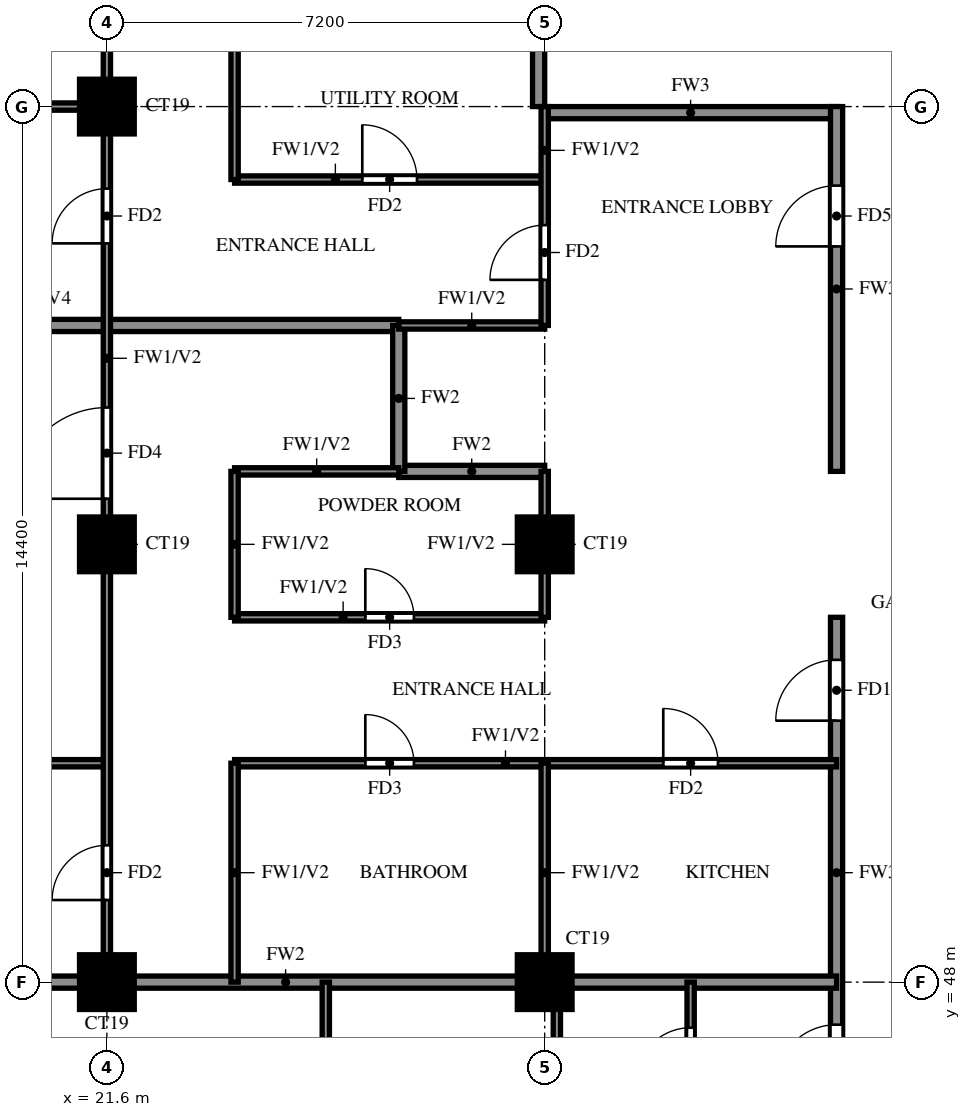
"""IFC4 building model, lengths in metres.
Left out: names, types, materials, properties, quantities, classifications, styles, units other than length and angle.
Written with IfcOpenShell. Run it as: python <this file> out.ifc"""

import sys

from ifc_helpers import new_model, si_unit, direction, frame, frame_2d, origin, origin_2d, place, context, subcontext, project, spatial, rectangle, extrude, source, transform, mapped, element, fill, save


model = new_model("IFC4")
c1 = context("Model", 3, precision=1e-05, world=origin(), true_north=direction((0.0, 1.0)))
c2 = subcontext(c1, "Body", "Model", "MODEL_VIEW")
j1 = project(units=[si_unit("LENGTHUNIT", "METRE"), si_unit("PLANEANGLEUNIT", "RADIAN")], contexts=[c1])
p1 = place(None, origin())
s1 = spatial("IfcSite", under=j1, at=p1, CompositionType="ELEMENT")
p2 = place(p1, origin())
s2 = spatial("IfcBuilding", under=s1, at=p2, CompositionType="ELEMENT")
p3 = place(p2, frame((0.0, 0.0, 181.5)))
s3 = spatial("IfcBuildingStorey", under=s2, at=p3, CompositionType="ELEMENT", Elevation=181.5)
m1 = source(origin(), c2, "Body", "SweptSolid", [
    extrude(rectangle(XDim=0.9, YDim=0.9, at=origin_2d()), origin(), (0.0, 0.0, 1.0), 3.2),
])
for number, where, z_axis, x_axis in (
    (1, (21.6, 48.0, 0.0), (0.0, 0.0, 1.0), (1.0, 0.0, 0.0)),
    (2, (28.8, 48.0, 0.0), (0.0, 0.0, 1.0), (1.0, 0.0, 0.0)),
    (3, (21.6, 55.2, 0.0), (0.0, 0.0, 1.0), (1.0, 0.0, 0.0)),
    (4, (28.8, 55.2, 0.0), (0.0, 0.0, 1.0), (1.0, 0.0, 0.0)),
    (5, (21.6, 62.4, 0.0), (0.0, 0.0, 1.0), (1.0, 0.0, 0.0)),
):
    element("IfcColumn", number, at=place(p3, frame(where, z_axis=z_axis, x_axis=x_axis)), inside=s3, PredefinedType="COLUMN", context=c2, shape_type="MappedRepresentation", body=[
        mapped(m1, transform((0.0, 0.0, 0.0))),
    ])
p4 = place(p3, frame((28.8, 62.3, 0.0), z_axis=(0.0, 0.0, 1.0), x_axis=(1.0, 0.0, 0.0)))
e6 = element("IfcWall", 6, at=p4, inside=s3, PredefinedType="SOLIDWALL", context=c2, shape_type="SweptSolid", body=[
    extrude(rectangle(XDim=4.8, YDim=0.2, at=frame_2d((2.4, 0.0))), origin(), (0.0, 0.0, 1.0), 3.2),
])
p5 = place(p3, frame((28.7, 62.4, 0.0), z_axis=(0.0, 0.0, 1.0), x_axis=(0.0, 1.0, 0.0)))
e7 = element("IfcWall", 7, at=p5, inside=s3, PredefinedType="SOLIDWALL", context=c2, shape_type="SweptSolid", body=[
    extrude(rectangle(XDim=15.6, YDim=0.2, at=frame_2d((7.8, 0.0))), origin(), (0.0, 0.0, 1.0), 3.2),
])
p6 = place(p3, frame((33.6, 45.6, 0.0), z_axis=(0.0, 0.0, 1.0), x_axis=(0.0, 1.0, 0.0)))
e8 = element("IfcWall", 8, at=p6, inside=s3, PredefinedType="SOLIDWALL", context=c2, shape_type="SweptSolid", body=[
    extrude(rectangle(XDim=8.4, YDim=0.2, at=frame_2d((4.2, 0.0))), origin(), (0.0, 0.0, 1.0), 3.2),
])
p7 = place(p6, frame((0.7, 0.0, 0.0)))
e9 = element("IfcOpeningElement", 9, at=p7, cuts=e8, PredefinedType="OPENING", context=c2, shape_type="SweptSolid", body=[
    extrude(rectangle(XDim=1.0, YDim=2.1, at=frame_2d((0.5, 1.05))), frame((0.0, 0.11, 0.0), z_axis=(0.0, -1.0, 0.0), x_axis=(1.0, 0.0, 0.0)), (0.0, 0.0, 1.0), 0.22),
])
p8 = place(p6, frame((6.7, 0.0, 0.0)))
e10 = element("IfcOpeningElement", 10, at=p8, cuts=e8, PredefinedType="OPENING", context=c2, shape_type="SweptSolid", body=[
    extrude(rectangle(XDim=1.0, YDim=2.1, at=frame_2d((0.5, 1.05))), frame((0.0, 0.11, 0.0), z_axis=(0.0, -1.0, 0.0), x_axis=(1.0, 0.0, 0.0)), (0.0, 0.0, 1.0), 0.22),
])
p9 = place(p3, frame((33.6, 56.4, 0.0), z_axis=(0.0, 0.0, 1.0), x_axis=(0.0, 1.0, 0.0)))
e11 = element("IfcWall", 11, at=p9, inside=s3, PredefinedType="SOLIDWALL", context=c2, shape_type="SweptSolid", body=[
    extrude(rectangle(XDim=6.0, YDim=0.2, at=frame_2d((3.0, 0.0))), origin(), (0.0, 0.0, 1.0), 3.2),
])
p10 = place(p9, frame((3.7, 0.0, 0.0)))
e12 = element("IfcOpeningElement", 12, at=p10, cuts=e11, PredefinedType="OPENING", context=c2, shape_type="SweptSolid", body=[
    extrude(rectangle(XDim=1.0, YDim=2.1, at=frame_2d((0.5, 1.05))), frame((0.0, 0.11, 0.0), z_axis=(0.0, -1.0, 0.0), x_axis=(1.0, 0.0, 0.0)), (0.0, 0.0, 1.0), 0.22),
])
p11 = place(p3, frame((14.525, 48.0, 0.0), z_axis=(0.0, 0.0, 1.0), x_axis=(1.0, 0.0, 0.0)))
e13 = element("IfcWall", 13, at=p11, inside=s3, PredefinedType="SOLIDWALL", context=c2, shape_type="SweptSolid", body=[
    extrude(rectangle(XDim=19.075, YDim=0.2, at=frame_2d((9.538, 0.0))), origin(), (0.0, 0.0, 1.0), 3.2),
])
p12 = place(p3, frame((26.4, 56.4, 0.0), z_axis=(0.0, 0.0, 1.0), x_axis=(1.0, 0.0, 0.0)))
e14 = element("IfcWall", 14, at=p12, inside=s3, PredefinedType="SOLIDWALL", context=c2, shape_type="SweptSolid", body=[
    extrude(rectangle(XDim=2.4, YDim=0.2, at=frame_2d((1.2, 0.0))), origin(), (0.0, 0.0, 1.0), 3.2),
])
p13 = place(p3, frame((14.525, 58.8, 0.0), z_axis=(0.0, 0.0, 1.0), x_axis=(1.0, 0.0, 0.0)))
e15 = element("IfcWall", 15, at=p13, inside=s3, PredefinedType="SOLIDWALL", context=c2, shape_type="SweptSolid", body=[
    extrude(rectangle(XDim=11.875, YDim=0.2, at=frame_2d((5.938, 0.0))), origin(), (0.0, 0.0, 1.0), 2.3),
])
p14 = place(p3, frame((26.4, 56.4, 0.0), z_axis=(0.0, 0.0, 1.0), x_axis=(0.0, 1.0, 0.0)))
e16 = element("IfcWall", 16, at=p14, inside=s3, PredefinedType="SOLIDWALL", context=c2, shape_type="SweptSolid", body=[
    extrude(rectangle(XDim=2.4, YDim=0.2, at=frame_2d((1.2, 0.0))), origin(), (0.0, 0.0, 1.0), 3.2),
])
p15 = place(p3, frame((14.525, 51.6, 0.0), z_axis=(0.0, 0.0, 1.0), x_axis=(1.0, 0.0, 0.0)))
e17 = element("IfcWall", 17, at=p15, inside=s3, PredefinedType="PARTITIONING", context=c2, shape_type="SweptSolid", body=[
    extrude(rectangle(XDim=7.075, YDim=0.12, at=frame_2d((3.538, 0.0))), origin(), (0.0, 0.0, 1.0), 2.3),
])
p16 = place(p3, frame((23.7, 51.6, 0.0), z_axis=(0.0, 0.0, 1.0), x_axis=(1.0, 0.0, 0.0)))
e18 = element("IfcWall", 18, at=p16, inside=s3, PredefinedType="PARTITIONING", context=c2, shape_type="SweptSolid", body=[
    extrude(rectangle(XDim=9.9, YDim=0.12, at=frame_2d((4.95, 0.0))), origin(), (0.0, 0.0, 1.0), 3.2),
])
p17 = place(p16, frame((2.15, 0.0, 0.0)))
e19 = element("IfcOpeningElement", 19, at=p17, cuts=e18, PredefinedType="OPENING", context=c2, shape_type="SweptSolid", body=[
    extrude(rectangle(XDim=0.8, YDim=2.1, at=frame_2d((0.4, 1.05))), frame((0.0, 0.07, 0.0), z_axis=(0.0, -1.0, 0.0), x_axis=(1.0, 0.0, 0.0)), (0.0, 0.0, 1.0), 0.14),
])
p18 = place(p16, frame((7.05, 0.0, 0.0)))
e20 = element("IfcOpeningElement", 20, at=p18, cuts=e18, PredefinedType="OPENING", context=c2, shape_type="SweptSolid", body=[
    extrude(rectangle(XDim=0.9, YDim=2.1, at=frame_2d((0.45, 1.05))), frame((0.0, 0.07, 0.0), z_axis=(0.0, -1.0, 0.0), x_axis=(1.0, 0.0, 0.0)), (0.0, 0.0, 1.0), 0.14),
])
p19 = place(p3, frame((23.7, 54.0, 0.0), z_axis=(0.0, 0.0, 1.0), x_axis=(1.0, 0.0, 0.0)))
e21 = element("IfcWall", 21, at=p19, inside=s3, PredefinedType="PARTITIONING", context=c2, shape_type="SweptSolid", body=[
    extrude(rectangle(XDim=5.1, YDim=0.12, at=frame_2d((2.55, 0.0))), origin(), (0.0, 0.0, 1.0), 3.2),
])
p20 = place(p19, frame((2.15, 0.0, 0.0)))
e22 = element("IfcOpeningElement", 22, at=p20, cuts=e21, PredefinedType="OPENING", context=c2, shape_type="SweptSolid", body=[
    extrude(rectangle(XDim=0.8, YDim=2.1, at=frame_2d((0.4, 1.05))), frame((0.0, 0.07, 0.0), z_axis=(0.0, -1.0, 0.0), x_axis=(1.0, 0.0, 0.0)), (0.0, 0.0, 1.0), 0.14),
])
p21 = place(p3, frame((23.7, 56.4, 0.0), z_axis=(0.0, 0.0, 1.0), x_axis=(1.0, 0.0, 0.0)))
e23 = element("IfcWall", 23, at=p21, inside=s3, PredefinedType="PARTITIONING", context=c2, shape_type="SweptSolid", body=[
    extrude(rectangle(XDim=2.7, YDim=0.12, at=frame_2d((1.35, 0.0))), origin(), (0.0, 0.0, 1.0), 3.2),
])
p22 = place(p3, frame((26.4, 58.8, 0.0), z_axis=(0.0, 0.0, 1.0), x_axis=(1.0, 0.0, 0.0)))
e24 = element("IfcWall", 24, at=p22, inside=s3, PredefinedType="PARTITIONING", context=c2, shape_type="SweptSolid", body=[
    extrude(rectangle(XDim=2.4, YDim=0.12, at=frame_2d((1.2, 0.0))), origin(), (0.0, 0.0, 1.0), 3.2),
])
p23 = place(p3, frame((23.7, 61.2, 0.0), z_axis=(0.0, 0.0, 1.0), x_axis=(1.0, 0.0, 0.0)))
e25 = element("IfcWall", 25, at=p23, inside=s3, PredefinedType="PARTITIONING", context=c2, shape_type="SweptSolid", body=[
    extrude(rectangle(XDim=5.1, YDim=0.12, at=frame_2d((2.55, 0.0))), origin(), (0.0, 0.0, 1.0), 3.2),
])
p24 = place(p23, frame((2.1, 0.0, 0.0)))
e26 = element("IfcOpeningElement", 26, at=p24, cuts=e25, PredefinedType="OPENING", context=c2, shape_type="SweptSolid", body=[
    extrude(rectangle(XDim=0.9, YDim=2.1, at=frame_2d((0.45, 1.05))), frame((0.0, 0.07, 0.0), z_axis=(0.0, -1.0, 0.0), x_axis=(1.0, 0.0, 0.0)), (0.0, 0.0, 1.0), 0.14),
])
p25 = place(p3, frame((14.525, 62.4, 0.0), z_axis=(0.0, 0.0, 1.0), x_axis=(1.0, 0.0, 0.0)))
e27 = element("IfcWall", 27, at=p25, inside=s3, PredefinedType="PARTITIONING", context=c2, shape_type="SweptSolid", body=[
    extrude(rectangle(XDim=7.075, YDim=0.12, at=frame_2d((3.538, 0.0))), origin(), (0.0, 0.0, 1.0), 3.2),
])
p26 = place(p3, frame((21.6, 48.0, 0.0), z_axis=(0.0, 0.0, 1.0), x_axis=(0.0, 1.0, 0.0)))
e28 = element("IfcWall", 28, at=p26, inside=s3, PredefinedType="PARTITIONING", context=c2, shape_type="SweptSolid", body=[
    extrude(rectangle(XDim=21.6, YDim=0.12, at=frame_2d((10.8, 0.0))), origin(), (0.0, 0.0, 1.0), 3.2),
])
p27 = place(p26, frame((1.35, 0.0, 0.0)))
e29 = element("IfcOpeningElement", 29, at=p27, cuts=e28, PredefinedType="OPENING", context=c2, shape_type="SweptSolid", body=[
    extrude(rectangle(XDim=0.9, YDim=2.1, at=frame_2d((0.45, 1.05))), frame((0.0, 0.07, 0.0), z_axis=(0.0, -1.0, 0.0), x_axis=(1.0, 0.0, 0.0)), (0.0, 0.0, 1.0), 0.14),
])
p28 = place(p26, frame((7.95, 0.0, 0.0)))
e30 = element("IfcOpeningElement", 30, at=p28, cuts=e28, PredefinedType="OPENING", context=c2, shape_type="SweptSolid", body=[
    extrude(rectangle(XDim=1.5, YDim=2.1, at=frame_2d((0.75, 1.05))), frame((0.0, 0.07, 0.0), z_axis=(0.0, -1.0, 0.0), x_axis=(1.0, 0.0, 0.0)), (0.0, 0.0, 1.0), 0.14),
])
p29 = place(p26, frame((12.15, 0.0, 0.0)))
e31 = element("IfcOpeningElement", 31, at=p29, cuts=e28, PredefinedType="OPENING", context=c2, shape_type="SweptSolid", body=[
    extrude(rectangle(XDim=0.9, YDim=2.1, at=frame_2d((0.45, 1.05))), frame((0.0, 0.07, 0.0), z_axis=(0.0, -1.0, 0.0), x_axis=(1.0, 0.0, 0.0)), (0.0, 0.0, 1.0), 0.14),
])
p30 = place(p26, frame((17.55, 0.0, 0.0)))
e32 = element("IfcOpeningElement", 32, at=p30, cuts=e28, PredefinedType="OPENING", context=c2, shape_type="SweptSolid", body=[
    extrude(rectangle(XDim=0.9, YDim=2.1, at=frame_2d((0.45, 1.05))), frame((0.0, 0.07, 0.0), z_axis=(0.0, -1.0, 0.0), x_axis=(1.0, 0.0, 0.0)), (0.0, 0.0, 1.0), 0.14),
])
p31 = place(p3, frame((23.7, 48.0, 0.0), z_axis=(0.0, 0.0, 1.0), x_axis=(0.0, 1.0, 0.0)))
e33 = element("IfcWall", 33, at=p31, inside=s3, PredefinedType="PARTITIONING", context=c2, shape_type="SweptSolid", body=[
    extrude(rectangle(XDim=3.6, YDim=0.12, at=frame_2d((1.8, 0.0))), origin(), (0.0, 0.0, 1.0), 3.2),
])
p32 = place(p3, frame((23.7, 54.0, 0.0), z_axis=(0.0, 0.0, 1.0), x_axis=(0.0, 1.0, 0.0)))
e34 = element("IfcWall", 34, at=p32, inside=s3, PredefinedType="PARTITIONING", context=c2, shape_type="SweptSolid", body=[
    extrude(rectangle(XDim=2.4, YDim=0.12, at=frame_2d((1.2, 0.0))), origin(), (0.0, 0.0, 1.0), 3.2),
])
p33 = place(p3, frame((23.7, 61.2, 0.0), z_axis=(0.0, 0.0, 1.0), x_axis=(0.0, 1.0, 0.0)))
e35 = element("IfcWall", 35, at=p33, inside=s3, PredefinedType="PARTITIONING", context=c2, shape_type="SweptSolid", body=[
    extrude(rectangle(XDim=12.0, YDim=0.12, at=frame_2d((6.0, 0.0))), origin(), (0.0, 0.0, 1.0), 3.2),
])
p34 = place(p33, frame((4.2, 0.0, 0.0)))
e36 = element("IfcOpeningElement", 36, at=p34, cuts=e35, PredefinedType="OPENING", context=c2, shape_type="SweptSolid", body=[
    extrude(rectangle(XDim=0.9, YDim=2.1, at=frame_2d((0.45, 1.05))), frame((0.0, 0.07, 0.0), z_axis=(0.0, -1.0, 0.0), x_axis=(1.0, 0.0, 0.0)), (0.0, 0.0, 1.0), 0.14),
])
p35 = place(p33, frame((7.975, 0.0, 0.0)))
e37 = element("IfcOpeningElement", 37, at=p35, cuts=e35, PredefinedType="OPENING", context=c2, shape_type="SweptSolid", body=[
    extrude(rectangle(XDim=0.8, YDim=2.1, at=frame_2d((0.4, 1.05))), frame((0.0, 0.07, 0.0), z_axis=(0.0, -1.0, 0.0), x_axis=(1.0, 0.0, 0.0)), (0.0, 0.0, 1.0), 0.14),
])
p36 = place(p33, frame((10.45, 0.0, 0.0)))
e38 = element("IfcOpeningElement", 38, at=p36, cuts=e35, PredefinedType="OPENING", context=c2, shape_type="SweptSolid", body=[
    extrude(rectangle(XDim=0.8, YDim=2.1, at=frame_2d((0.4, 1.05))), frame((0.0, 0.07, 0.0), z_axis=(0.0, -1.0, 0.0), x_axis=(1.0, 0.0, 0.0)), (0.0, 0.0, 1.0), 0.14),
])
p37 = place(p3, frame((25.2, 39.725, 0.0), z_axis=(0.0, 0.0, 1.0), x_axis=(0.0, 1.0, 0.0)))
e39 = element("IfcWall", 39, at=p37, inside=s3, PredefinedType="PARTITIONING", context=c2, shape_type="SweptSolid", body=[
    extrude(rectangle(XDim=8.275, YDim=0.12, at=frame_2d((4.137, 0.0))), origin(), (0.0, 0.0, 1.0), 3.2),
])
p38 = place(p37, frame((4.525, 0.0, 0.0)))
e40 = element("IfcOpeningElement", 40, at=p38, cuts=e39, PredefinedType="OPENING", context=c2, shape_type="SweptSolid", body=[
    extrude(rectangle(XDim=0.9, YDim=2.1, at=frame_2d((0.45, 1.05))), frame((0.0, 0.07, 0.0), z_axis=(0.0, -1.0, 0.0), x_axis=(1.0, 0.0, 0.0)), (0.0, 0.0, 1.0), 0.14),
])
p39 = place(p3, frame((28.8, 48.0, 0.0), z_axis=(0.0, 0.0, 1.0), x_axis=(0.0, 1.0, 0.0)))
e41 = element("IfcWall", 41, at=p39, inside=s3, PredefinedType="PARTITIONING", context=c2, shape_type="SweptSolid", body=[
    extrude(rectangle(XDim=3.6, YDim=0.12, at=frame_2d((1.8, 0.0))), origin(), (0.0, 0.0, 1.0), 3.2),
])
p40 = place(p3, frame((28.8, 54.0, 0.0), z_axis=(0.0, 0.0, 1.0), x_axis=(0.0, 1.0, 0.0)))
e42 = element("IfcWall", 42, at=p40, inside=s3, PredefinedType="PARTITIONING", context=c2, shape_type="SweptSolid", body=[
    extrude(rectangle(XDim=2.4, YDim=0.12, at=frame_2d((1.2, 0.0))), origin(), (0.0, 0.0, 1.0), 3.2),
])
p41 = place(p3, frame((28.8, 58.8, 0.0), z_axis=(0.0, 0.0, 1.0), x_axis=(0.0, 1.0, 0.0)))
e43 = element("IfcWall", 43, at=p41, inside=s3, PredefinedType="PARTITIONING", context=c2, shape_type="SweptSolid", body=[
    extrude(rectangle(XDim=3.6, YDim=0.12, at=frame_2d((1.8, 0.0))), origin(), (0.0, 0.0, 1.0), 3.2),
])
p42 = place(p41, frame((0.75, 0.0, 0.0)))
e44 = element("IfcOpeningElement", 44, at=p42, cuts=e43, PredefinedType="OPENING", context=c2, shape_type="SweptSolid", body=[
    extrude(rectangle(XDim=0.9, YDim=2.1, at=frame_2d((0.45, 1.05))), frame((0.0, 0.07, 0.0), z_axis=(0.0, -1.0, 0.0), x_axis=(1.0, 0.0, 0.0)), (0.0, 0.0, 1.0), 0.14),
])
p43 = place(p3, frame((29.0, 45.6, 0.0), z_axis=(0.0, 0.0, 1.0), x_axis=(0.0, 1.0, 0.0)))
e45 = element("IfcWall", 45, at=p43, inside=s3, PredefinedType="PARTITIONING", context=c2, shape_type="SweptSolid", body=[
    extrude(rectangle(XDim=2.4, YDim=0.12, at=frame_2d((1.2, 0.0))), origin(), (0.0, 0.0, 1.0), 3.2),
])
p44 = place(p3, frame((31.2, 45.6, 0.0), z_axis=(0.0, 0.0, 1.0), x_axis=(0.0, 1.0, 0.0)))
e46 = element("IfcWall", 46, at=p44, inside=s3, PredefinedType="PARTITIONING", context=c2, shape_type="SweptSolid", body=[
    extrude(rectangle(XDim=2.4, YDim=0.12, at=frame_2d((1.2, 0.0))), origin(), (0.0, 0.0, 1.0), 3.2),
])
p45 = place(p44, frame((0.75, 0.0, 0.0)))
e47 = element("IfcOpeningElement", 47, at=p45, cuts=e46, PredefinedType="OPENING", context=c2, shape_type="SweptSolid", body=[
    extrude(rectangle(XDim=0.9, YDim=2.1, at=frame_2d((0.45, 1.05))), frame((0.0, 0.07, 0.0), z_axis=(0.0, -1.0, 0.0), x_axis=(1.0, 0.0, 0.0)), (0.0, 0.0, 1.0), 0.14),
])
p46 = place(p7, origin())
e48 = element("IfcDoor", 48, at=p46, inside=s3, OperationType="SINGLE_SWING_RIGHT", PredefinedType="DOOR", context=c2, shape_type="SweptSolid", body=[
    extrude(rectangle(XDim=1.0, YDim=2.1, at=frame_2d((0.5, 1.05))), frame((0.0, 0.025, 0.0), z_axis=(0.0, -1.0, 0.0), x_axis=(1.0, 0.0, 0.0)), (0.0, 0.0, 1.0), 0.05),
])
fill(e9, e48)
p47 = place(p45, origin())
e49 = element("IfcDoor", 49, at=p47, inside=s3, OperationType="SINGLE_SWING_LEFT", PredefinedType="DOOR", context=c2, shape_type="SweptSolid", body=[
    extrude(rectangle(XDim=0.9, YDim=2.1, at=frame_2d((0.45, 1.05))), frame((0.0, 0.025, 0.0), z_axis=(0.0, -1.0, 0.0), x_axis=(1.0, 0.0, 0.0)), (0.0, 0.0, 1.0), 0.05),
])
fill(e47, e49)
p48 = place(p8, origin())
e50 = element("IfcDoor", 50, at=p48, inside=s3, OperationType="SINGLE_SWING_LEFT", PredefinedType="DOOR", context=c2, shape_type="SweptSolid", body=[
    extrude(rectangle(XDim=1.0, YDim=2.1, at=frame_2d((0.5, 1.05))), frame((0.0, 0.025, 0.0), z_axis=(0.0, -1.0, 0.0), x_axis=(1.0, 0.0, 0.0)), (0.0, 0.0, 1.0), 0.05),
])
fill(e10, e50)
p49 = place(p27, origin())
e51 = element("IfcDoor", 51, at=p49, inside=s3, OperationType="SINGLE_SWING_LEFT", PredefinedType="DOOR", context=c2, shape_type="SweptSolid", body=[
    extrude(rectangle(XDim=0.9, YDim=2.1, at=frame_2d((0.45, 1.05))), frame((0.0, 0.025, 0.0), z_axis=(0.0, -1.0, 0.0), x_axis=(1.0, 0.0, 0.0)), (0.0, 0.0, 1.0), 0.05),
])
fill(e29, e51)
p50 = place(p28, origin())
e52 = element("IfcDoor", 52, at=p50, inside=s3, OperationType="SINGLE_SWING_LEFT", PredefinedType="DOOR", context=c2, shape_type="SweptSolid", body=[
    extrude(rectangle(XDim=1.5, YDim=2.1, at=frame_2d((0.75, 1.05))), frame((0.0, 0.025, 0.0), z_axis=(0.0, -1.0, 0.0), x_axis=(1.0, 0.0, 0.0)), (0.0, 0.0, 1.0), 0.05),
])
fill(e30, e52)
p51 = place(p17, origin())
e53 = element("IfcDoor", 53, at=p51, inside=s3, OperationType="SINGLE_SWING_LEFT", PredefinedType="DOOR", context=c2, shape_type="SweptSolid", body=[
    extrude(rectangle(XDim=0.8, YDim=2.1, at=frame_2d((0.4, 1.05))), frame((0.0, 0.025, 0.0), z_axis=(0.0, -1.0, 0.0), x_axis=(1.0, 0.0, 0.0)), (0.0, 0.0, 1.0), 0.05),
])
fill(e19, e53)
p52 = place(p20, origin())
e54 = element("IfcDoor", 54, at=p52, inside=s3, OperationType="SINGLE_SWING_LEFT", PredefinedType="DOOR", context=c2, shape_type="SweptSolid", body=[
    extrude(rectangle(XDim=0.8, YDim=2.1, at=frame_2d((0.4, 1.05))), frame((0.0, 0.025, 0.0), z_axis=(0.0, -1.0, 0.0), x_axis=(1.0, 0.0, 0.0)), (0.0, 0.0, 1.0), 0.05),
])
fill(e22, e54)
p53 = place(p18, origin())
e55 = element("IfcDoor", 55, at=p53, inside=s3, OperationType="SINGLE_SWING_RIGHT", PredefinedType="DOOR", context=c2, shape_type="SweptSolid", body=[
    extrude(rectangle(XDim=0.9, YDim=2.1, at=frame_2d((0.45, 1.05))), frame((0.0, 0.025, 0.0), z_axis=(0.0, -1.0, 0.0), x_axis=(1.0, 0.0, 0.0)), (0.0, 0.0, 1.0), 0.05),
])
fill(e20, e55)
p54 = place(p42, origin())
e56 = element("IfcDoor", 56, at=p54, inside=s3, OperationType="SINGLE_SWING_LEFT", PredefinedType="DOOR", context=c2, shape_type="SweptSolid", body=[
    extrude(rectangle(XDim=0.9, YDim=2.1, at=frame_2d((0.45, 1.05))), frame((0.0, 0.025, 0.0), z_axis=(0.0, -1.0, 0.0), x_axis=(1.0, 0.0, 0.0)), (0.0, 0.0, 1.0), 0.05),
])
fill(e44, e56)
p55 = place(p10, origin())
e57 = element("IfcDoor", 57, at=p55, inside=s3, OperationType="SINGLE_SWING_LEFT", PredefinedType="DOOR", context=c2, shape_type="SweptSolid", body=[
    extrude(rectangle(XDim=1.0, YDim=2.1, at=frame_2d((0.5, 1.05))), frame((0.0, 0.025, 0.0), z_axis=(0.0, -1.0, 0.0), x_axis=(1.0, 0.0, 0.0)), (0.0, 0.0, 1.0), 0.05),
])
fill(e12, e57)
p56 = place(p29, origin())
e58 = element("IfcDoor", 58, at=p56, inside=s3, OperationType="SINGLE_SWING_RIGHT", PredefinedType="DOOR", context=c2, shape_type="SweptSolid", body=[
    extrude(rectangle(XDim=0.9, YDim=2.1, at=frame_2d((0.45, 1.05))), frame((0.0, 0.025, 0.0), z_axis=(0.0, -1.0, 0.0), x_axis=(1.0, 0.0, 0.0)), (0.0, 0.0, 1.0), 0.05),
])
fill(e31, e58)
p57 = place(p24, origin())
e59 = element("IfcDoor", 59, at=p57, inside=s3, OperationType="SINGLE_SWING_LEFT", PredefinedType="DOOR", context=c2, shape_type="SweptSolid", body=[
    extrude(rectangle(XDim=0.9, YDim=2.1, at=frame_2d((0.45, 1.05))), frame((0.0, 0.025, 0.0), z_axis=(0.0, -1.0, 0.0), x_axis=(1.0, 0.0, 0.0)), (0.0, 0.0, 1.0), 0.05),
])
fill(e26, e59)
save(model, sys.argv[1])
